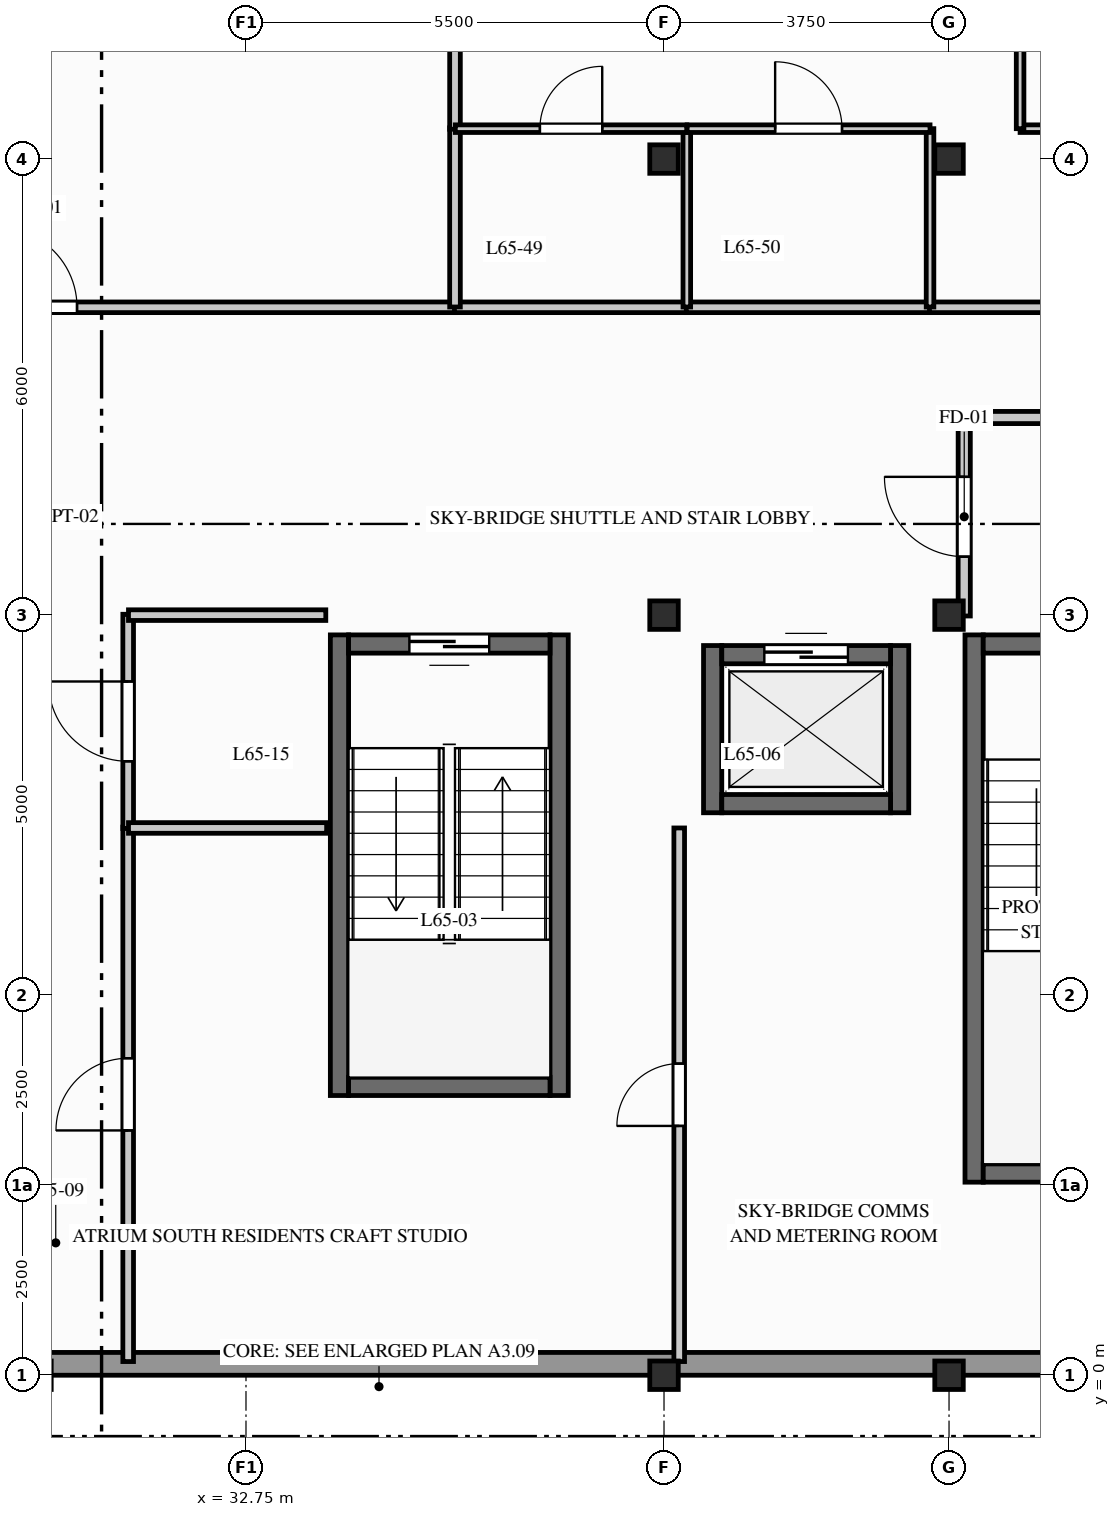
"""IFC4 building model, lengths in metres.
Left out: names, types, materials, properties, quantities, classifications, styles, units other than length and angle.
Written with IfcOpenShell. Run it as: python <this file> out.ifc"""

import sys

from ifc_helpers import new_model, si_unit, direction, frame, frame_2d, origin, origin_2d, place, context, subcontext, project, spatial, rectangle, i_section, extrude, element, fill, save


model = new_model("IFC4")
c1 = context("Model", 3, precision=1e-05, world=origin(), true_north=direction((0.0, 1.0)))
c2 = subcontext(c1, "Body", "Model", "MODEL_VIEW")
j1 = project(units=[si_unit("LENGTHUNIT", "METRE"), si_unit("PLANEANGLEUNIT", "RADIAN")], contexts=[c1])
p1 = place(None, origin())
s1 = spatial("IfcSite", under=j1, at=p1, CompositionType="ELEMENT")
p2 = place(p1, origin())
s2 = spatial("IfcBuilding", under=s1, at=p2, CompositionType="ELEMENT")
p3 = place(p2, frame((0.0, 0.0, 214.4)))
s3 = spatial("IfcBuildingStorey", under=s2, at=p3, CompositionType="ELEMENT", Elevation=214.4)
for number, where, z_axis, x_axis in (
    (1, (38.25, 0.0, 0.0), (0.0, 0.0, 1.0), (1.0, 0.0, 0.0)),
    (2, (38.25, 10.0, 0.0), (0.0, 0.0, 1.0), (1.0, 0.0, 0.0)),
    (3, (38.25, 16.0, 0.0), (0.0, 0.0, 1.0), (1.0, 0.0, 0.0)),
    (4, (42.0, 0.0, 0.0), (0.0, 0.0, 1.0), (1.0, 0.0, 0.0)),
    (5, (42.0, 10.0, 0.0), (0.0, 0.0, 1.0), (1.0, 0.0, 0.0)),
    (6, (42.0, 16.0, 0.0), (0.0, 0.0, 1.0), (1.0, 0.0, 0.0)),
):
    element("IfcColumn", number, at=place(p3, frame(where, z_axis=z_axis, x_axis=x_axis)), inside=s3, PredefinedType="COLUMN", context=c2, shape_type="SweptSolid", body=[
        extrude(i_section(OverallWidth=0.375, OverallDepth=0.375, WebThickness=0.017, FlangeThickness=0.027, FilletRadius=0.015, at=origin_2d()), origin(), (0.0, 0.0, 1.0), 3.6),
    ])
p4 = place(p3, frame((2.5, 0.15, 0.0), z_axis=(0.0, 0.0, 1.0), x_axis=(1.0, 0.0, 0.0)))
e7 = element("IfcWall", 7, at=p4, inside=s3, PredefinedType="STANDARD", context=c2, shape_type="SweptSolid", body=[
    extrude(rectangle(XDim=55.0, YDim=0.3, at=frame_2d((27.5, 0.0))), origin(), (0.0, 0.0, 1.0), 2.454),
])
p5 = place(p4, frame((4.85, 0.0, 0.0)))
e8 = element("IfcOpeningElement", 8, at=p5, cuts=e7, PredefinedType="OPENING", context=c2, shape_type="SweptSolid", body=[
    extrude(rectangle(XDim=1.1, YDim=2.2, at=frame_2d((0.55, 1.1))), frame((0.0, 0.16, 0.0), z_axis=(0.0, -1.0, 0.0), x_axis=(1.0, 0.0, 0.0)), (0.0, 0.0, 1.0), 0.32),
])
p6 = place(p4, frame((1.0, 0.0, 0.434)))
e9 = element("IfcOpeningElement", 9, at=p6, cuts=e7, PredefinedType="OPENING", context=c2, shape_type="SweptSolid", body=[
    extrude(rectangle(XDim=1.5, YDim=1.8, at=frame_2d((0.75, 0.9))), frame((0.0, 0.16, 0.0), z_axis=(0.0, -1.0, 0.0), x_axis=(1.0, 0.0, 0.0)), (0.0, 0.0, 1.0), 0.32),
])
p7 = place(p4, frame((47.2, 0.0, 0.334)))
e10 = element("IfcOpeningElement", 10, at=p7, cuts=e7, PredefinedType="OPENING", context=c2, shape_type="SweptSolid", body=[
    extrude(rectangle(XDim=1.65, YDim=1.9, at=frame_2d((0.825, 0.95))), frame((0.0, 0.16, 0.0), z_axis=(0.0, -1.0, 0.0), x_axis=(1.0, 0.0, 0.0)), (0.0, 0.0, 1.0), 0.32),
])
p8 = place(p4, frame((52.3, 0.0, 0.634)))
e11 = element("IfcOpeningElement", 11, at=p8, cuts=e7, PredefinedType="OPENING", context=c2, shape_type="SweptSolid", body=[
    extrude(rectangle(XDim=1.2, YDim=1.6, at=frame_2d((0.6, 0.8))), frame((0.0, 0.16, 0.0), z_axis=(0.0, -1.0, 0.0), x_axis=(1.0, 0.0, 0.0)), (0.0, 0.0, 1.0), 0.32),
])
p9 = place(p3, frame((42.33, 2.54, 0.0), z_axis=(0.0, 0.0, 1.0), x_axis=(0.0, 1.0, 0.0)))
e12 = element("IfcWall", 12, at=p9, inside=s3, PredefinedType="SHEAR", context=c2, shape_type="SweptSolid", body=[
    extrude(rectangle(XDim=7.2, YDim=0.24, at=frame_2d((3.6, 0.0))), origin(), (0.0, 0.0, 1.0), 3.33),
])
p10 = place(p3, frame((42.45, 2.66, 0.0), z_axis=(0.0, 0.0, 1.0), x_axis=(1.0, 0.0, 0.0)))
e13 = element("IfcWall", 13, at=p10, inside=s3, PredefinedType="SHEAR", context=c2, shape_type="SweptSolid", body=[
    extrude(rectangle(XDim=2.95, YDim=0.24, at=frame_2d((1.475, 0.0))), origin(), (0.0, 0.0, 1.0), 3.33),
])
p11 = place(p3, frame((45.4, 9.62, 0.0), z_axis=(0.0, 0.0, 1.0), x_axis=(-1.0, 0.0, 0.0)))
e14 = element("IfcWall", 14, at=p11, inside=s3, PredefinedType="SHEAR", context=c2, shape_type="SweptSolid", body=[
    extrude(rectangle(XDim=2.95, YDim=0.24, at=frame_2d((1.475, 0.0))), origin(), (0.0, 0.0, 1.0), 3.33),
])
p12 = place(p11, frame((0.95, 0.0, 0.0)))
e15 = element("IfcOpeningElement", 15, at=p12, cuts=e14, PredefinedType="OPENING", context=c2, shape_type="SweptSolid", body=[
    extrude(rectangle(XDim=1.05, YDim=2.06, at=frame_2d((0.525, 1.03))), frame((0.0, 0.13, 0.0), z_axis=(0.0, -1.0, 0.0), x_axis=(1.0, 0.0, 0.0)), (0.0, 0.0, 1.0), 0.26),
])
for number, where, z_axis, x_axis in (
    (16, (33.98, 3.68, 0.0), (0.0, 0.0, 1.0), (0.0, 1.0, 0.0)),
    (17, (36.87, 3.68, 0.0), (0.0, 0.0, 1.0), (0.0, 1.0, 0.0)),
):
    element("IfcWall", number, at=place(p3, frame(where, z_axis=z_axis, x_axis=x_axis)), inside=s3, PredefinedType="SHEAR", context=c2, shape_type="SweptSolid", body=[
        extrude(rectangle(XDim=6.06, YDim=0.24, at=frame_2d((3.03, 0.0))), origin(), (0.0, 0.0, 1.0), 3.33),
    ])
p13 = place(p3, frame((34.1, 3.8, 0.0), z_axis=(0.0, 0.0, 1.0), x_axis=(1.0, 0.0, 0.0)))
e18 = element("IfcWall", 18, at=p13, inside=s3, PredefinedType="SHEAR", context=c2, shape_type="SweptSolid", body=[
    extrude(rectangle(XDim=2.65, YDim=0.24, at=frame_2d((1.325, 0.0))), origin(), (0.0, 0.0, 1.0), 3.33),
])
p14 = place(p3, frame((36.75, 9.62, 0.0), z_axis=(0.0, 0.0, 1.0), x_axis=(-1.0, 0.0, 0.0)))
e19 = element("IfcWall", 19, at=p14, inside=s3, PredefinedType="SHEAR", context=c2, shape_type="SweptSolid", body=[
    extrude(rectangle(XDim=2.65, YDim=0.24, at=frame_2d((1.325, 0.0))), origin(), (0.0, 0.0, 1.0), 3.33),
])
p15 = place(p14, frame((0.8, 0.0, 0.0)))
e20 = element("IfcOpeningElement", 20, at=p15, cuts=e19, PredefinedType="OPENING", context=c2, shape_type="SweptSolid", body=[
    extrude(rectangle(XDim=1.05, YDim=2.06, at=frame_2d((0.525, 1.03))), frame((0.0, 0.13, 0.0), z_axis=(0.0, -1.0, 0.0), x_axis=(1.0, 0.0, 0.0)), (0.0, 0.0, 1.0), 0.26),
])
for number, where, z_axis, x_axis in (
    (21, (38.89, 7.4, 0.0), (0.0, 0.0, 1.0), (0.0, 1.0, 0.0)),
    (22, (41.35, 7.4, 0.0), (0.0, 0.0, 1.0), (0.0, 1.0, 0.0)),
):
    element("IfcWall", number, at=place(p3, frame(where, z_axis=z_axis, x_axis=x_axis)), inside=s3, PredefinedType="SHEAR", context=c2, shape_type="SweptSolid", body=[
        extrude(rectangle(XDim=2.2, YDim=0.24, at=frame_2d((1.1, 0.0))), origin(), (0.0, 0.0, 1.0), 3.33),
    ])
p16 = place(p3, frame((39.01, 7.52, 0.0), z_axis=(0.0, 0.0, 1.0), x_axis=(1.0, 0.0, 0.0)))
e23 = element("IfcWall", 23, at=p16, inside=s3, PredefinedType="SHEAR", context=c2, shape_type="SweptSolid", body=[
    extrude(rectangle(XDim=2.22, YDim=0.24, at=frame_2d((1.11, 0.0))), origin(), (0.0, 0.0, 1.0), 3.33),
])
p17 = place(p3, frame((39.01, 9.48, 0.0), z_axis=(0.0, 0.0, 1.0), x_axis=(1.0, 0.0, 0.0)))
e24 = element("IfcWall", 24, at=p17, inside=s3, PredefinedType="SHEAR", context=c2, shape_type="SweptSolid", body=[
    extrude(rectangle(XDim=2.22, YDim=0.24, at=frame_2d((1.11, 0.0))), origin(), (0.0, 0.0, 1.0), 3.33),
])
p18 = place(p17, frame((0.56, 0.0, 0.0)))
e25 = element("IfcOpeningElement", 25, at=p18, cuts=e24, PredefinedType="OPENING", context=c2, shape_type="SweptSolid", body=[
    extrude(rectangle(XDim=1.1, YDim=2.06, at=frame_2d((0.55, 1.03))), frame((0.0, 0.13, 0.0), z_axis=(0.0, -1.0, 0.0), x_axis=(1.0, 0.0, 0.0)), (0.0, 0.0, 1.0), 0.26),
])
p19 = place(p3, frame((31.2, 0.18, 0.0), z_axis=(0.0, 0.0, 1.0), x_axis=(0.0, 1.0, 0.0)))
e26 = element("IfcWall", 26, at=p19, inside=s3, PredefinedType="PARTITIONING", context=c2, shape_type="SweptSolid", body=[
    extrude(rectangle(XDim=7.031, YDim=0.14, at=frame_2d((3.516, 0.0))), origin(), (0.0, 0.0, 1.0), 3.33),
])
p20 = place(p19, frame((3.041, 0.0, 0.0)))
e27 = element("IfcOpeningElement", 27, at=p20, cuts=e26, PredefinedType="OPENING", context=c2, shape_type="SweptSolid", body=[
    extrude(rectangle(XDim=0.95, YDim=2.05, at=frame_2d((0.475, 1.025))), frame((0.0, 0.08, 0.0), z_axis=(0.0, -1.0, 0.0), x_axis=(1.0, 0.0, 0.0)), (0.0, 0.0, 1.0), 0.16),
])
p21 = place(p3, frame((31.2, 7.193, 0.0), z_axis=(0.0, 0.0, 1.0), x_axis=(0.0, 1.0, 0.0)))
e28 = element("IfcWall", 28, at=p21, inside=s3, PredefinedType="PARTITIONING", context=c2, shape_type="SweptSolid", body=[
    extrude(rectangle(XDim=2.819, YDim=0.14, at=frame_2d((1.409, 0.0))), origin(), (0.0, 0.0, 1.0), 2.454),
])
p22 = place(p21, frame((0.884, 0.0, 0.0)))
e29 = element("IfcOpeningElement", 29, at=p22, cuts=e28, PredefinedType="OPENING", context=c2, shape_type="SweptSolid", body=[
    extrude(rectangle(XDim=1.05, YDim=2.06, at=frame_2d((0.525, 1.03))), frame((0.0, 0.08, 0.0), z_axis=(0.0, -1.0, 0.0), x_axis=(1.0, 0.0, 0.0)), (0.0, 0.0, 1.0), 0.16),
])
p23 = place(p3, frame((31.204, 7.2, 0.0), z_axis=(0.0, 0.0, 1.0), x_axis=(1.0, 0.0, 0.0)))
e30 = element("IfcWall", 30, at=p23, inside=s3, PredefinedType="PARTITIONING", context=c2, shape_type="SweptSolid", body=[
    extrude(rectangle(XDim=2.607, YDim=0.14, at=frame_2d((1.304, 0.0))), origin(), (0.0, 0.0, 1.0), 3.33),
])
p24 = place(p3, frame((38.45, 0.18, 0.0), z_axis=(0.0, 0.0, 1.0), x_axis=(0.0, 1.0, 0.0)))
e31 = element("IfcWall", 31, at=p24, inside=s3, PredefinedType="PARTITIONING", context=c2, shape_type="SweptSolid", body=[
    extrude(rectangle(XDim=7.02, YDim=0.14, at=frame_2d((3.51, 0.0))), origin(), (0.0, 0.0, 1.0), 2.685),
])
p25 = place(p24, frame((3.1, 0.0, 0.0)))
e32 = element("IfcOpeningElement", 32, at=p25, cuts=e31, PredefinedType="OPENING", context=c2, shape_type="SweptSolid", body=[
    extrude(rectangle(XDim=0.82, YDim=2.02, at=frame_2d((0.41, 1.01))), frame((0.0, 0.08, 0.0), z_axis=(0.0, -1.0, 0.0), x_axis=(1.0, 0.0, 0.0)), (0.0, 0.0, 1.0), 0.16),
])
p26 = place(p3, frame((31.204, 10.0, 0.0), z_axis=(0.0, 0.0, 1.0), x_axis=(1.0, 0.0, 0.0)))
e33 = element("IfcWall", 33, at=p26, inside=s3, PredefinedType="PARTITIONING", context=c2, shape_type="SweptSolid", body=[
    extrude(rectangle(XDim=2.596, YDim=0.14, at=frame_2d((1.298, 0.0))), origin(), (0.0, 0.0, 1.0), 2.454),
])
p27 = place(p3, frame((42.2, 9.989, 0.0), z_axis=(0.0, 0.0, 1.0), x_axis=(0.0, 1.0, 0.0)))
e34 = element("IfcWall", 34, at=p27, inside=s3, PredefinedType="PARTITIONING", context=c2, shape_type="SweptSolid", body=[
    extrude(rectangle(XDim=2.611, YDim=0.16, at=frame_2d((1.306, 0.0))), origin(), (0.0, 0.0, 1.0), 2.685),
])
p28 = place(p27, frame((0.781, 0.0, 0.0)))
e35 = element("IfcOpeningElement", 35, at=p28, cuts=e34, PredefinedType="OPENING", context=c2, shape_type="SweptSolid", body=[
    extrude(rectangle(XDim=1.05, YDim=2.06, at=frame_2d((0.525, 1.03))), frame((0.0, 0.09, 0.0), z_axis=(0.0, -1.0, 0.0), x_axis=(1.0, 0.0, 0.0)), (0.0, 0.0, 1.0), 0.18),
])
p29 = place(p3, frame((42.2, 12.6, 0.0), z_axis=(0.0, 0.0, 1.0), x_axis=(1.0, 0.0, 0.0)))
e36 = element("IfcWall", 36, at=p29, inside=s3, PredefinedType="PARTITIONING", context=c2, shape_type="SweptSolid", body=[
    extrude(rectangle(XDim=5.8, YDim=0.16, at=frame_2d((2.9, 0.0))), origin(), (0.0, 0.0, 1.0), 2.685),
])
p30 = place(p29, frame((2.375, 0.0, 0.0)))
e37 = element("IfcOpeningElement", 37, at=p30, cuts=e36, PredefinedType="OPENING", context=c2, shape_type="SweptSolid", body=[
    extrude(rectangle(XDim=1.05, YDim=2.06, at=frame_2d((0.525, 1.03))), frame((0.0, 0.09, 0.0), z_axis=(0.0, -1.0, 0.0), x_axis=(1.0, 0.0, 0.0)), (0.0, 0.0, 1.0), 0.18),
])
p31 = place(p3, frame((24.493, 14.05, 0.0), z_axis=(0.0, 0.0, 1.0), x_axis=(1.0, 0.0, 0.0)))
e38 = element("IfcWall", 38, at=p31, inside=s3, PredefinedType="PARTITIONING", context=c2, shape_type="SweptSolid", body=[
    extrude(rectangle(XDim=11.019, YDim=0.14, at=frame_2d((5.509, 0.0))), origin(), (0.0, 0.0, 1.0), 2.685),
])
p32 = place(p31, frame((4.984, 0.0, 0.0)))
e39 = element("IfcOpeningElement", 39, at=p32, cuts=e38, PredefinedType="OPENING", context=c2, shape_type="SweptSolid", body=[
    extrude(rectangle(XDim=1.05, YDim=2.06, at=frame_2d((0.525, 1.03))), frame((0.0, 0.08, 0.0), z_axis=(0.0, -1.0, 0.0), x_axis=(1.0, 0.0, 0.0)), (0.0, 0.0, 1.0), 0.16),
])
p33 = place(p3, frame((35.493, 14.05, 0.0), z_axis=(0.0, 0.0, 1.0), x_axis=(1.0, 0.0, 0.0)))
e40 = element("IfcWall", 40, at=p33, inside=s3, PredefinedType="PARTITIONING", context=c2, shape_type="SweptSolid", body=[
    extrude(rectangle(XDim=3.069, YDim=0.14, at=frame_2d((1.534, 0.0))), origin(), (0.0, 0.0, 1.0), 2.685),
])
p34 = place(p3, frame((38.543, 14.05, 0.0), z_axis=(0.0, 0.0, 1.0), x_axis=(1.0, 0.0, 0.0)))
e41 = element("IfcWall", 41, at=p34, inside=s3, PredefinedType="PARTITIONING", context=c2, shape_type="SweptSolid", body=[
    extrude(rectangle(XDim=3.219, YDim=0.14, at=frame_2d((1.609, 0.0))), origin(), (0.0, 0.0, 1.0), 3.33),
])
p35 = place(p3, frame((41.743, 14.05, 0.0), z_axis=(0.0, 0.0, 1.0), x_axis=(1.0, 0.0, 0.0)))
e42 = element("IfcWall", 42, at=p35, inside=s3, PredefinedType="PARTITIONING", context=c2, shape_type="SweptSolid", body=[
    extrude(rectangle(XDim=6.269, YDim=0.14, at=frame_2d((3.134, 0.0))), origin(), (0.0, 0.0, 1.0), 2.685),
])
p36 = place(p35, frame((2.659, 0.0, 0.0)))
e43 = element("IfcOpeningElement", 43, at=p36, cuts=e42, PredefinedType="OPENING", context=c2, shape_type="SweptSolid", body=[
    extrude(rectangle(XDim=0.95, YDim=2.05, at=frame_2d((0.475, 1.025))), frame((0.0, 0.08, 0.0), z_axis=(0.0, -1.0, 0.0), x_axis=(1.0, 0.0, 0.0)), (0.0, 0.0, 1.0), 0.16),
])
p37 = place(p3, frame((35.5, 14.054, 0.0), z_axis=(0.0, 0.0, 1.0), x_axis=(0.0, 1.0, 0.0)))
e44 = element("IfcWall", 44, at=p37, inside=s3, PredefinedType="PARTITIONING", context=c2, shape_type="SweptSolid", body=[
    extrude(rectangle(XDim=2.357, YDim=0.14, at=frame_2d((1.179, 0.0))), origin(), (0.0, 0.0, 1.0), 2.454),
])
p38 = place(p3, frame((35.5, 16.393, 0.0), z_axis=(0.0, 0.0, 1.0), x_axis=(0.0, 1.0, 0.0)))
e45 = element("IfcWall", 45, at=p38, inside=s3, PredefinedType="PARTITIONING", context=c2, shape_type="SweptSolid", body=[
    extrude(rectangle(XDim=5.315, YDim=0.14, at=frame_2d((2.657, 0.0))), origin(), (0.0, 0.0, 1.0), 2.899),
])
p39 = place(p3, frame((38.55, 14.054, 0.0), z_axis=(0.0, 0.0, 1.0), x_axis=(0.0, 1.0, 0.0)))
e46 = element("IfcWall", 46, at=p39, inside=s3, PredefinedType="PARTITIONING", context=c2, shape_type="SweptSolid", body=[
    extrude(rectangle(XDim=2.346, YDim=0.1, at=frame_2d((1.173, 0.0))), origin(), (0.0, 0.0, 1.0), 2.685),
])
p40 = place(p3, frame((35.504, 16.4, 0.0), z_axis=(0.0, 0.0, 1.0), x_axis=(1.0, 0.0, 0.0)))
e47 = element("IfcWall", 47, at=p40, inside=s3, PredefinedType="PARTITIONING", context=c2, shape_type="SweptSolid", body=[
    extrude(rectangle(XDim=3.046, YDim=0.1, at=frame_2d((1.523, 0.0))), origin(), (0.0, 0.0, 1.0), 2.685),
])
p41 = place(p40, frame((1.113, 0.0, 0.0)))
e48 = element("IfcOpeningElement", 48, at=p41, cuts=e47, PredefinedType="OPENING", context=c2, shape_type="SweptSolid", body=[
    extrude(rectangle(XDim=0.82, YDim=2.02, at=frame_2d((0.41, 1.01))), frame((0.0, 0.06, 0.0), z_axis=(0.0, -1.0, 0.0), x_axis=(1.0, 0.0, 0.0)), (0.0, 0.0, 1.0), 0.12),
])
p42 = place(p3, frame((41.75, 14.054, 0.0), z_axis=(0.0, 0.0, 1.0), x_axis=(0.0, 1.0, 0.0)))
e49 = element("IfcWall", 49, at=p42, inside=s3, PredefinedType="PARTITIONING", context=c2, shape_type="SweptSolid", body=[
    extrude(rectangle(XDim=2.346, YDim=0.1, at=frame_2d((1.173, 0.0))), origin(), (0.0, 0.0, 1.0), 2.685),
])
p43 = place(p3, frame((38.554, 16.4, 0.0), z_axis=(0.0, 0.0, 1.0), x_axis=(1.0, 0.0, 0.0)))
e50 = element("IfcWall", 50, at=p43, inside=s3, PredefinedType="PARTITIONING", context=c2, shape_type="SweptSolid", body=[
    extrude(rectangle(XDim=3.196, YDim=0.1, at=frame_2d((1.598, 0.0))), origin(), (0.0, 0.0, 1.0), 3.33),
])
p44 = place(p43, frame((1.158, 0.0, 0.0)))
e51 = element("IfcOpeningElement", 51, at=p44, cuts=e50, PredefinedType="OPENING", context=c2, shape_type="SweptSolid", body=[
    extrude(rectangle(XDim=0.88, YDim=2.04, at=frame_2d((0.44, 1.02))), frame((0.0, 0.06, 0.0), z_axis=(0.0, -1.0, 0.0), x_axis=(1.0, 0.0, 0.0)), (0.0, 0.0, 1.0), 0.12),
])
p45 = place(p3, frame((42.935, 16.4, 0.0), z_axis=(0.0, 0.0, 1.0), x_axis=(1.0, 0.0, 0.0)))
e52 = element("IfcWall", 52, at=p45, inside=s3, PredefinedType="PARTITIONING", context=c2, shape_type="SweptSolid", body=[
    extrude(rectangle(XDim=5.065, YDim=0.1, at=frame_2d((2.532, 0.0))), origin(), (0.0, 0.0, 1.0), 2.685),
])
p46 = place(p3, frame((42.935, 16.4, 0.0), z_axis=(0.0, 0.0, 1.0), x_axis=(0.0, 1.0, 0.0)))
e53 = element("IfcWall", 53, at=p46, inside=s3, PredefinedType="PARTITIONING", context=c2, shape_type="SweptSolid", body=[
    extrude(rectangle(XDim=5.296, YDim=0.1, at=frame_2d((2.648, 0.0))), origin(), (0.0, 0.0, 1.0), 2.899),
])
p47 = place(p46, frame((2.208, 0.0, 0.0)))
e54 = element("IfcOpeningElement", 54, at=p47, cuts=e53, PredefinedType="OPENING", context=c2, shape_type="SweptSolid", body=[
    extrude(rectangle(XDim=0.88, YDim=2.04, at=frame_2d((0.44, 1.02))), frame((0.0, 0.06, 0.0), z_axis=(0.0, -1.0, 0.0), x_axis=(1.0, 0.0, 0.0)), (0.0, 0.0, 1.0), 0.12),
])
p48 = place(p15, origin())
e55 = element("IfcDoor", 55, at=p48, inside=s3, OperationType="SINGLE_SWING_RIGHT", PredefinedType="DOOR", context=c2, shape_type="SweptSolid", body=[
    extrude(rectangle(XDim=1.05, YDim=2.06, at=frame_2d((0.525, 1.03))), frame((0.0, 0.025, 0.0), z_axis=(0.0, -1.0, 0.0), x_axis=(1.0, 0.0, 0.0)), (0.0, 0.0, 1.0), 0.05),
])
fill(e20, e55)
p49 = place(p18, origin())
e56 = element("IfcDoor", 56, at=p49, inside=s3, OperationType="SLIDING_TO_LEFT", PredefinedType="DOOR", context=c2, shape_type="SweptSolid", body=[
    extrude(rectangle(XDim=1.1, YDim=2.06, at=frame_2d((0.55, 1.03))), frame((0.0, 0.025, 0.0), z_axis=(0.0, -1.0, 0.0), x_axis=(1.0, 0.0, 0.0)), (0.0, 0.0, 1.0), 0.05),
])
fill(e25, e56)
p50 = place(p20, origin())
e57 = element("IfcDoor", 57, at=p50, inside=s3, OperationType="SINGLE_SWING_LEFT", PredefinedType="DOOR", context=c2, shape_type="SweptSolid", body=[
    extrude(rectangle(XDim=0.95, YDim=2.05, at=frame_2d((0.475, 1.025))), frame((0.0, 0.025, 0.0), z_axis=(0.0, -1.0, 0.0), x_axis=(1.0, 0.0, 0.0)), (0.0, 0.0, 1.0), 0.05),
])
fill(e27, e57)
p51 = place(p22, origin())
e58 = element("IfcDoor", 58, at=p51, inside=s3, OperationType="SINGLE_SWING_RIGHT", PredefinedType="DOOR", context=c2, shape_type="SweptSolid", body=[
    extrude(rectangle(XDim=1.05, YDim=2.06, at=frame_2d((0.525, 1.03))), frame((0.0, 0.025, 0.0), z_axis=(0.0, -1.0, 0.0), x_axis=(1.0, 0.0, 0.0)), (0.0, 0.0, 1.0), 0.05),
])
fill(e29, e58)
p52 = place(p28, origin())
e59 = element("IfcDoor", 59, at=p52, inside=s3, OperationType="SINGLE_SWING_RIGHT", PredefinedType="DOOR", context=c2, shape_type="SweptSolid", body=[
    extrude(rectangle(XDim=1.05, YDim=2.06, at=frame_2d((0.525, 1.03))), frame((0.0, 0.025, 0.0), z_axis=(0.0, -1.0, 0.0), x_axis=(1.0, 0.0, 0.0)), (0.0, 0.0, 1.0), 0.05),
])
fill(e35, e59)
p53 = place(p32, origin())
e60 = element("IfcDoor", 60, at=p53, inside=s3, OperationType="SINGLE_SWING_LEFT", PredefinedType="DOOR", context=c2, shape_type="SweptSolid", body=[
    extrude(rectangle(XDim=1.05, YDim=2.06, at=frame_2d((0.525, 1.03))), frame((0.0, 0.025, 0.0), z_axis=(0.0, -1.0, 0.0), x_axis=(1.0, 0.0, 0.0)), (0.0, 0.0, 1.0), 0.05),
])
fill(e39, e60)
p54 = place(p41, origin())
e61 = element("IfcDoor", 61, at=p54, inside=s3, OperationType="SINGLE_SWING_RIGHT", PredefinedType="DOOR", context=c2, shape_type="SweptSolid", body=[
    extrude(rectangle(XDim=0.82, YDim=2.02, at=frame_2d((0.41, 1.01))), frame((0.0, 0.025, 0.0), z_axis=(0.0, -1.0, 0.0), x_axis=(1.0, 0.0, 0.0)), (0.0, 0.0, 1.0), 0.05),
])
fill(e48, e61)
p55 = place(p44, origin())
e62 = element("IfcDoor", 62, at=p55, inside=s3, OperationType="SINGLE_SWING_LEFT", PredefinedType="DOOR", context=c2, shape_type="SweptSolid", body=[
    extrude(rectangle(XDim=0.88, YDim=2.04, at=frame_2d((0.44, 1.02))), frame((0.0, 0.025, 0.0), z_axis=(0.0, -1.0, 0.0), x_axis=(1.0, 0.0, 0.0)), (0.0, 0.0, 1.0), 0.05),
])
fill(e51, e62)
p56 = place(p25, origin())
e63 = element("IfcDoor", 63, at=p56, inside=s3, OperationType="SINGLE_SWING_LEFT", PredefinedType="DOOR", context=c2, shape_type="SweptSolid", body=[
    extrude(rectangle(XDim=0.82, YDim=2.02, at=frame_2d((0.41, 1.01))), frame((0.0, 0.025, 0.0), z_axis=(0.0, -1.0, 0.0), x_axis=(1.0, 0.0, 0.0)), (0.0, 0.0, 1.0), 0.05),
])
fill(e32, e63)
save(model, sys.argv[1])
